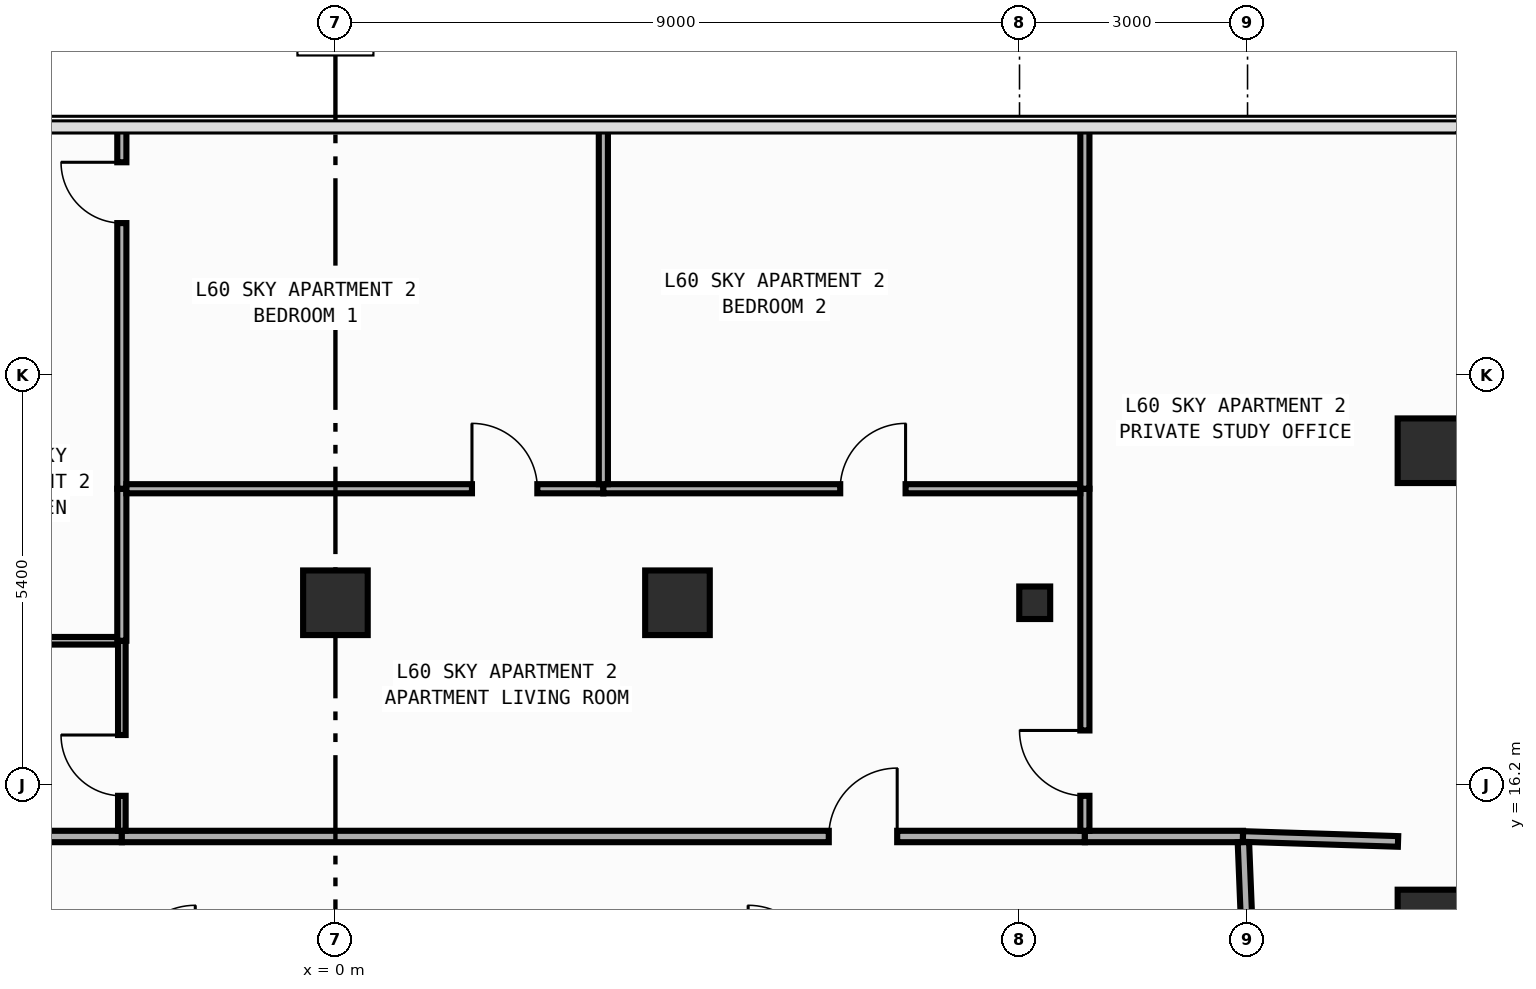
"""IFC4 building model, lengths in metres.
Left out: names, types, materials, properties, quantities, classifications, styles, units other than length and angle.
Written with IfcOpenShell. Run it as: python <this file> out.ifc"""

import sys

from ifc_helpers import new_model, si_unit, direction, frame, frame_2d, origin, origin_2d, place, context, subcontext, project, spatial, rectangle, i_section, extrude, element, fill, save


model = new_model("IFC4")
c1 = context("Model", 3, precision=1e-05, world=origin(), true_north=direction((0.0, 1.0)))
c2 = subcontext(c1, "Body", "Model", "MODEL_VIEW")
j1 = project(units=[si_unit("LENGTHUNIT", "METRE"), si_unit("PLANEANGLEUNIT", "RADIAN")], contexts=[c1])
p1 = place(None, origin())
s1 = spatial("IfcSite", under=j1, at=p1, CompositionType="ELEMENT")
p2 = place(p1, origin())
s2 = spatial("IfcBuilding", under=s1, at=p2, CompositionType="ELEMENT")
p3 = place(p2, frame((0.0, 0.0, 254.8)))
s3 = spatial("IfcBuildingStorey", under=s2, at=p3, CompositionType="ELEMENT", Elevation=254.8)
p4 = place(p3, frame((9.2, 18.6, 0.0), z_axis=(0.0, 0.0, 1.0), x_axis=(1.0, 0.0, 0.0)))
e1 = element("IfcColumn", 1, at=p4, inside=s3, PredefinedType="COLUMN", context=c2, shape_type="SweptSolid", body=[
    extrude(i_section(OverallWidth=0.407, OverallDepth=0.428, WebThickness=0.02, FlangeThickness=0.035, FilletRadius=0.022, at=origin_2d()), origin(), (0.0, 0.0, 1.0), 3.6),
])
for number, where, z_axis, x_axis in (
    (2, (14.4, 14.4, 0.0), (0.0, 0.0, 1.0), (1.0, 0.0, 0.0)),
    (3, (0.0, 18.6, 0.0), (0.0, 0.0, 1.0), (1.0, 0.0, 0.0)),
    (4, (4.5, 18.6, 0.0), (0.0, 0.0, 1.0), (1.0, 0.0, 0.0)),
    (5, (14.4, 20.6, 0.0), (0.0, 0.0, 1.0), (1.0, 0.0, 0.0)),
):
    element("IfcColumn", number, at=place(p3, frame(where, z_axis=z_axis, x_axis=x_axis)), inside=s3, PredefinedType="COLUMN", context=c2, shape_type="SweptSolid", body=[
        extrude(rectangle(XDim=0.85, YDim=0.85, at=origin_2d()), origin(), (0.0, 0.0, 1.0), 3.6),
    ])
p5 = place(p3, frame((-5.4, 15.525, 0.0), z_axis=(0.0, 0.0, 1.0), x_axis=(1.0, 0.0, 0.0)))
e6 = element("IfcWall", 6, at=p5, inside=s3, PredefinedType="PARTITIONING", context=c2, shape_type="SweptSolid", body=[
    extrude(rectangle(XDim=2.59, YDim=0.15, at=frame_2d((1.295, 0.0))), origin(), (0.0, 0.0, 1.0), 3.34),
])
p6 = place(p3, frame((-2.81, 15.525, 0.0), z_axis=(0.0, 0.0, 1.0), x_axis=(1.0, 0.0, 0.0)))
e7 = element("IfcWall", 7, at=p6, inside=s3, PredefinedType="PARTITIONING", context=c2, shape_type="SweptSolid", body=[
    extrude(rectangle(XDim=12.67, YDim=0.15, at=frame_2d((6.335, 0.0))), origin(), (0.0, 0.0, 1.0), 3.34),
])
p7 = place(p6, frame((9.301, 0.0, 0.0)))
e8 = element("IfcOpeningElement", 8, at=p7, cuts=e7, PredefinedType="OPENING", context=c2, shape_type="SweptSolid", body=[
    extrude(rectangle(XDim=0.9, YDim=2.15, at=frame_2d((0.45, 1.075))), frame((0.0, 0.085, 0.0), z_axis=(0.0, -1.0, 0.0), x_axis=(1.0, 0.0, 0.0)), (0.0, 0.0, 1.0), 0.17),
])
p8 = place(p3, frame((9.86, 15.525, 0.0), z_axis=(0.0, 0.0, 1.0), x_axis=(1.0, 0.0, 0.0)))
e9 = element("IfcWall", 9, at=p8, inside=s3, PredefinedType="PARTITIONING", context=c2, shape_type="SweptSolid", body=[
    extrude(rectangle(XDim=2.08, YDim=0.15, at=frame_2d((1.04, 0.0))), origin(), (0.0, 0.0, 1.0), 3.34),
])
p9 = place(p3, frame((12.015, 13.72, 0.0), z_axis=(0.0, 0.0, 1.0), x_axis=(-0.040046877756, 0.99919780203, 0.0)))
e10 = element("IfcWall", 10, at=p9, inside=s3, PredefinedType="PARTITIONING", context=c2, shape_type="SweptSolid", body=[
    extrude(rectangle(XDim=1.731, YDim=0.15, at=frame_2d((0.866, 0.0))), origin(), (0.0, 0.0, 1.0), 3.34),
])
p10 = place(p3, frame((-5.33, 18.1, 0.0), z_axis=(0.0, 0.0, 1.0), x_axis=(1.0, 0.0, 0.0)))
e11 = element("IfcWall", 11, at=p10, inside=s3, PredefinedType="PARTITIONING", context=c2, shape_type="SweptSolid", body=[
    extrude(rectangle(XDim=2.47, YDim=0.1, at=frame_2d((1.235, 0.0))), origin(), (0.0, 0.0, 1.0), 3.34),
])
p11 = place(p3, frame((-2.81, 15.6, 0.0), z_axis=(0.0, 0.0, 1.0), x_axis=(0.0, 1.0, 0.0)))
e12 = element("IfcWall", 12, at=p11, inside=s3, PredefinedType="PARTITIONING", context=c2, shape_type="SweptSolid", body=[
    extrude(rectangle(XDim=2.5, YDim=0.1, at=frame_2d((1.25, 0.0))), origin(), (0.0, 0.0, 1.0), 3.34),
])
p12 = place(p11, frame((0.46, 0.0, 0.0)))
e13 = element("IfcOpeningElement", 13, at=p12, cuts=e12, PredefinedType="OPENING", context=c2, shape_type="SweptSolid", body=[
    extrude(rectangle(XDim=0.8, YDim=2.1, at=frame_2d((0.4, 1.05))), frame((0.0, 0.06, 0.0), z_axis=(0.0, -1.0, 0.0), x_axis=(1.0, 0.0, 0.0)), (0.0, 0.0, 1.0), 0.12),
])
p13 = place(p3, frame((-2.81, 18.1, 0.0), z_axis=(0.0, 0.0, 1.0), x_axis=(0.0, 1.0, 0.0)))
e14 = element("IfcWall", 14, at=p13, inside=s3, PredefinedType="PARTITIONING", context=c2, shape_type="SweptSolid", body=[
    extrude(rectangle(XDim=2.0, YDim=0.12, at=frame_2d((1.0, 0.0))), origin(), (0.0, 0.0, 1.0), 3.34),
])
p14 = place(p3, frame((-2.81, 20.1, 0.0), z_axis=(0.0, 0.0, 1.0), x_axis=(0.0, 1.0, 0.0)))
e15 = element("IfcWall", 15, at=p14, inside=s3, PredefinedType="PARTITIONING", context=c2, shape_type="SweptSolid", body=[
    extrude(rectangle(XDim=4.755, YDim=0.12, at=frame_2d((2.377, 0.0))), origin(), (0.0, 0.0, 1.0), 3.34),
])
p15 = place(p14, frame((3.495, 0.0, 0.0)))
e16 = element("IfcOpeningElement", 16, at=p15, cuts=e15, PredefinedType="OPENING", context=c2, shape_type="SweptSolid", body=[
    extrude(rectangle(XDim=0.8, YDim=2.1, at=frame_2d((0.4, 1.05))), frame((0.0, 0.07, 0.0), z_axis=(0.0, -1.0, 0.0), x_axis=(1.0, 0.0, 0.0)), (0.0, 0.0, 1.0), 0.14),
])
p16 = place(p3, frame((9.86, 15.6, 0.0), z_axis=(0.0, 0.0, 1.0), x_axis=(0.0, 1.0, 0.0)))
e17 = element("IfcWall", 17, at=p16, inside=s3, PredefinedType="PARTITIONING", context=c2, shape_type="SweptSolid", body=[
    extrude(rectangle(XDim=4.5, YDim=0.12, at=frame_2d((2.25, 0.0))), origin(), (0.0, 0.0, 1.0), 3.34),
])
p17 = place(p16, frame((0.46, 0.0, 0.0)))
e18 = element("IfcOpeningElement", 18, at=p17, cuts=e17, PredefinedType="OPENING", context=c2, shape_type="SweptSolid", body=[
    extrude(rectangle(XDim=0.86, YDim=2.15, at=frame_2d((0.43, 1.075))), frame((0.0, 0.07, 0.0), z_axis=(0.0, -1.0, 0.0), x_axis=(1.0, 0.0, 0.0)), (0.0, 0.0, 1.0), 0.14),
])
p18 = place(p3, frame((-2.75, 20.1, 0.0), z_axis=(0.0, 0.0, 1.0), x_axis=(1.0, 0.0, 0.0)))
e19 = element("IfcWall", 19, at=p18, inside=s3, PredefinedType="PARTITIONING", context=c2, shape_type="SweptSolid", body=[
    extrude(rectangle(XDim=6.275, YDim=0.12, at=frame_2d((3.137, 0.0))), origin(), (0.0, 0.0, 1.0), 3.34),
])
p19 = place(p18, frame((4.546, 0.0, 0.0)))
e20 = element("IfcOpeningElement", 20, at=p19, cuts=e19, PredefinedType="OPENING", context=c2, shape_type="SweptSolid", body=[
    extrude(rectangle(XDim=0.86, YDim=2.15, at=frame_2d((0.43, 1.075))), frame((0.0, 0.07, 0.0), z_axis=(0.0, -1.0, 0.0), x_axis=(1.0, 0.0, 0.0)), (0.0, 0.0, 1.0), 0.14),
])
p20 = place(p3, frame((3.525, 20.1, 0.0), z_axis=(0.0, 0.0, 1.0), x_axis=(1.0, 0.0, 0.0)))
e21 = element("IfcWall", 21, at=p20, inside=s3, PredefinedType="PARTITIONING", context=c2, shape_type="SweptSolid", body=[
    extrude(rectangle(XDim=6.275, YDim=0.12, at=frame_2d((3.138, 0.0))), origin(), (0.0, 0.0, 1.0), 3.34),
])
p21 = place(p20, frame((3.116, 0.0, 0.0)))
e22 = element("IfcOpeningElement", 22, at=p21, cuts=e21, PredefinedType="OPENING", context=c2, shape_type="SweptSolid", body=[
    extrude(rectangle(XDim=0.86, YDim=2.15, at=frame_2d((0.43, 1.075))), frame((0.0, 0.07, 0.0), z_axis=(0.0, -1.0, 0.0), x_axis=(1.0, 0.0, 0.0)), (0.0, 0.0, 1.0), 0.14),
])
p22 = place(p3, frame((9.86, 20.1, 0.0), z_axis=(0.0, 0.0, 1.0), x_axis=(0.0, 1.0, 0.0)))
e23 = element("IfcWall", 23, at=p22, inside=s3, PredefinedType="PARTITIONING", context=c2, shape_type="SweptSolid", body=[
    extrude(rectangle(XDim=4.755, YDim=0.12, at=frame_2d((2.377, 0.0))), origin(), (0.0, 0.0, 1.0), 3.34),
])
p23 = place(p3, frame((11.94, 15.525, 0.0), z_axis=(0.0, 0.0, 1.0), x_axis=(0.999493701671, -0.031817295912, 0.0)))
e24 = element("IfcWall", 24, at=p23, inside=s3, PredefinedType="PARTITIONING", context=c2, shape_type="SweptSolid", body=[
    extrude(rectangle(XDim=2.041, YDim=0.14, at=frame_2d((1.021, 0.0))), origin(), (0.0, 0.0, 1.0), 3.34),
])
p24 = place(p3, frame((3.525, 20.16, 0.0), z_axis=(0.0, 0.0, 1.0), x_axis=(0.0, 1.0, 0.0)))
e25 = element("IfcWall", 25, at=p24, inside=s3, PredefinedType="PARTITIONING", context=c2, shape_type="SweptSolid", body=[
    extrude(rectangle(XDim=4.695, YDim=0.12, at=frame_2d((2.348, 0.0))), origin(), (0.0, 0.0, 1.0), 3.34),
])
p25 = place(p7, origin())
e26 = element("IfcDoor", 26, at=p25, inside=s3, OperationType="SINGLE_SWING_RIGHT", PredefinedType="DOOR", context=c2, shape_type="SweptSolid", body=[
    extrude(rectangle(XDim=0.9, YDim=2.15, at=frame_2d((0.45, 1.075))), frame((0.0, 0.025, 0.0), z_axis=(0.0, -1.0, 0.0), x_axis=(1.0, 0.0, 0.0)), (0.0, 0.0, 1.0), 0.05),
])
fill(e8, e26)
p26 = place(p12, origin())
e27 = element("IfcDoor", 27, at=p26, inside=s3, OperationType="SINGLE_SWING_RIGHT", PredefinedType="DOOR", context=c2, shape_type="SweptSolid", body=[
    extrude(rectangle(XDim=0.8, YDim=2.1, at=frame_2d((0.4, 1.05))), frame((0.0, 0.025, 0.0), z_axis=(0.0, -1.0, 0.0), x_axis=(1.0, 0.0, 0.0)), (0.0, 0.0, 1.0), 0.05),
])
fill(e13, e27)
p27 = place(p17, origin())
e28 = element("IfcDoor", 28, at=p27, inside=s3, OperationType="SINGLE_SWING_RIGHT", PredefinedType="DOOR", context=c2, shape_type="SweptSolid", body=[
    extrude(rectangle(XDim=0.86, YDim=2.15, at=frame_2d((0.43, 1.075))), frame((0.0, 0.025, 0.0), z_axis=(0.0, -1.0, 0.0), x_axis=(1.0, 0.0, 0.0)), (0.0, 0.0, 1.0), 0.05),
])
fill(e18, e28)
p28 = place(p19, origin())
e29 = element("IfcDoor", 29, at=p28, inside=s3, OperationType="SINGLE_SWING_LEFT", PredefinedType="DOOR", context=c2, shape_type="SweptSolid", body=[
    extrude(rectangle(XDim=0.86, YDim=2.15, at=frame_2d((0.43, 1.075))), frame((0.0, 0.025, 0.0), z_axis=(0.0, -1.0, 0.0), x_axis=(1.0, 0.0, 0.0)), (0.0, 0.0, 1.0), 0.05),
])
fill(e20, e29)
p29 = place(p21, origin())
e30 = element("IfcDoor", 30, at=p29, inside=s3, OperationType="SINGLE_SWING_RIGHT", PredefinedType="DOOR", context=c2, shape_type="SweptSolid", body=[
    extrude(rectangle(XDim=0.86, YDim=2.15, at=frame_2d((0.43, 1.075))), frame((0.0, 0.025, 0.0), z_axis=(0.0, -1.0, 0.0), x_axis=(1.0, 0.0, 0.0)), (0.0, 0.0, 1.0), 0.05),
])
fill(e22, e30)
p30 = place(p15, origin())
e31 = element("IfcDoor", 31, at=p30, inside=s3, OperationType="SINGLE_SWING_RIGHT", PredefinedType="DOOR", context=c2, shape_type="SweptSolid", body=[
    extrude(rectangle(XDim=0.8, YDim=2.1, at=frame_2d((0.4, 1.05))), frame((0.0, 0.025, 0.0), z_axis=(0.0, -1.0, 0.0), x_axis=(1.0, 0.0, 0.0)), (0.0, 0.0, 1.0), 0.05),
])
fill(e16, e31)
save(model, sys.argv[1])
